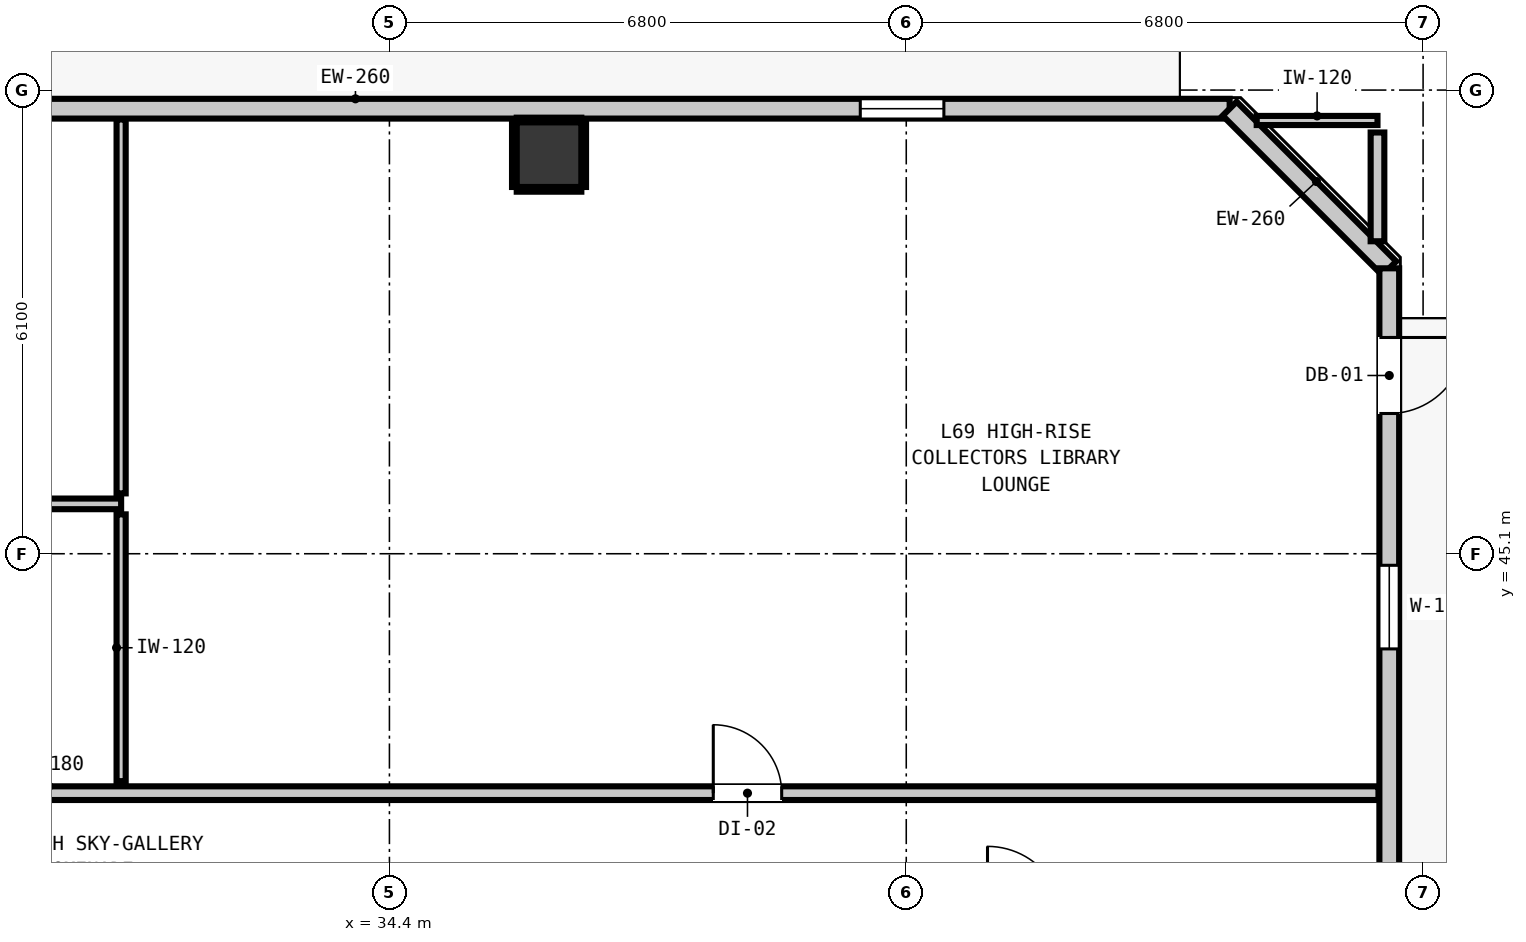
"""IFC4 building model, lengths in metres.
Left out: names, types, materials, properties, quantities, classifications, styles, units other than length and angle.
Written with IfcOpenShell. Run it as: python <this file> out.ifc"""

import sys

from ifc_helpers import new_model, si_unit, direction, frame, frame_2d, origin, origin_2d, place, context, subcontext, project, spatial, rectangle, extrude, element, fill, save


model = new_model("IFC4")
c1 = context("Model", 3, precision=1e-05, world=origin(), true_north=direction((0.0, 1.0)))
c2 = subcontext(c1, "Body", "Model", "MODEL_VIEW")
j1 = project(units=[si_unit("LENGTHUNIT", "METRE"), si_unit("PLANEANGLEUNIT", "RADIAN")], contexts=[c1])
p1 = place(None, origin())
s1 = spatial("IfcSite", under=j1, at=p1, CompositionType="ELEMENT")
p2 = place(p1, origin())
s2 = spatial("IfcBuilding", under=s1, at=p2, CompositionType="ELEMENT")
p3 = place(p2, frame((0.0, 0.0, 237.92)))
s3 = spatial("IfcBuildingStorey", under=s2, at=p3, CompositionType="ELEMENT", Elevation=237.92)
p4 = place(p3, frame((36.5, 50.35, 0.0), z_axis=(0.0, 0.0, 1.0), x_axis=(1.0, 0.0, 0.0)))
e1 = element("IfcColumn", 1, at=p4, inside=s3, PredefinedType="COLUMN", context=c2, shape_type="SweptSolid", body=[
    extrude(rectangle(XDim=0.85, YDim=0.85, at=origin_2d()), origin(), (0.0, 0.0, 1.0), 3.32),
])
p5 = place(p3, frame((12.745, 50.955, 0.0), z_axis=(0.0, 0.0, 1.0), x_axis=(1.0, 0.0, 0.0)))
e2 = element("IfcWall", 2, at=p5, inside=s3, PredefinedType="STANDARD", context=c2, shape_type="SweptSolid", body=[
    extrude(rectangle(XDim=32.71, YDim=0.26, at=frame_2d((16.355, 0.0))), origin(), (0.0, 0.0, 1.0), 3.1),
])
p6 = place(p5, frame((1.61, 0.0, 0.0)))
e3 = element("IfcOpeningElement", 3, at=p6, cuts=e2, PredefinedType="OPENING", context=c2, shape_type="SweptSolid", body=[
    extrude(rectangle(XDim=1.0, YDim=2.15, at=frame_2d((0.5, 1.075))), frame((0.0, 0.14, 0.0), z_axis=(0.0, -1.0, 0.0), x_axis=(1.0, 0.0, 0.0)), (0.0, 0.0, 1.0), 0.28),
])
p7 = place(p5, frame((5.301, 0.0, 0.85)))
e4 = element("IfcOpeningElement", 4, at=p7, cuts=e2, PredefinedType="OPENING", context=c2, shape_type="SweptSolid", body=[
    extrude(rectangle(XDim=1.1, YDim=2.05, at=frame_2d((0.55, 1.025))), frame((0.0, 0.14, 0.0), z_axis=(0.0, -1.0, 0.0), x_axis=(1.0, 0.0, 0.0)), (0.0, 0.0, 1.0), 0.28),
])
p8 = place(p5, frame((3.052, 0.0, 0.85)))
e5 = element("IfcOpeningElement", 5, at=p8, cuts=e2, PredefinedType="OPENING", context=c2, shape_type="SweptSolid", body=[
    extrude(rectangle(XDim=0.58, YDim=1.5, at=frame_2d((0.29, 0.75))), frame((0.0, 0.14, 0.0), z_axis=(0.0, -1.0, 0.0), x_axis=(1.0, 0.0, 0.0)), (0.0, 0.0, 1.0), 0.28),
])
p9 = place(p5, frame((13.466, 0.0, 0.85)))
e6 = element("IfcOpeningElement", 6, at=p9, cuts=e2, PredefinedType="OPENING", context=c2, shape_type="SweptSolid", body=[
    extrude(rectangle(XDim=1.1, YDim=2.05, at=frame_2d((0.55, 1.025))), frame((0.0, 0.14, 0.0), z_axis=(0.0, -1.0, 0.0), x_axis=(1.0, 0.0, 0.0)), (0.0, 0.0, 1.0), 0.28),
])
p10 = place(p5, frame((27.85, 0.0, 0.85)))
e7 = element("IfcOpeningElement", 7, at=p10, cuts=e2, PredefinedType="OPENING", context=c2, shape_type="SweptSolid", body=[
    extrude(rectangle(XDim=1.1, YDim=2.05, at=frame_2d((0.55, 1.025))), frame((0.0, 0.14, 0.0), z_axis=(0.0, -1.0, 0.0), x_axis=(1.0, 0.0, 0.0)), (0.0, 0.0, 1.0), 0.28),
])
p11 = place(p3, frame((45.455, 50.955, 0.0), z_axis=(0.0, 0.0, 1.0), x_axis=(0.707065676302, -0.707147883682, 0.0)))
e8 = element("IfcWall", 8, at=p11, inside=s3, PredefinedType="STANDARD", context=c2, shape_type="SweptSolid", body=[
    extrude(rectangle(XDim=2.97, YDim=0.26, at=frame_2d((1.485, 0.0))), origin(), (0.0, 0.0, 1.0), 3.1),
])
p12 = place(p3, frame((47.555, 48.855, 0.0), z_axis=(0.0, 0.0, 1.0), x_axis=(0.0, -1.0, 0.0)))
e9 = element("IfcWall", 9, at=p12, inside=s3, PredefinedType="STANDARD", context=c2, shape_type="SweptSolid", body=[
    extrude(rectangle(XDim=30.31, YDim=0.26, at=frame_2d((15.155, 0.0))), origin(), (0.0, 0.0, 1.0), 3.1),
])
p13 = place(p12, frame((0.91, 0.0, 0.0)))
e10 = element("IfcOpeningElement", 10, at=p13, cuts=e9, PredefinedType="OPENING", context=c2, shape_type="SweptSolid", body=[
    extrude(rectangle(XDim=1.0, YDim=2.15, at=frame_2d((0.5, 1.075))), frame((0.0, 0.14, 0.0), z_axis=(0.0, -1.0, 0.0), x_axis=(1.0, 0.0, 0.0)), (0.0, 0.0, 1.0), 0.28),
])
p14 = place(p12, frame((3.907, 0.0, 0.85)))
e11 = element("IfcOpeningElement", 11, at=p14, cuts=e9, PredefinedType="OPENING", context=c2, shape_type="SweptSolid", body=[
    extrude(rectangle(XDim=1.1, YDim=2.05, at=frame_2d((0.55, 1.025))), frame((0.0, 0.14, 0.0), z_axis=(0.0, -1.0, 0.0), x_axis=(1.0, 0.0, 0.0)), (0.0, 0.0, 1.0), 0.28),
])
p15 = place(p12, frame((21.955, 0.0, 0.85)))
e12 = element("IfcOpeningElement", 12, at=p15, cuts=e9, PredefinedType="OPENING", context=c2, shape_type="SweptSolid", body=[
    extrude(rectangle(XDim=1.1, YDim=2.05, at=frame_2d((0.55, 1.025))), frame((0.0, 0.14, 0.0), z_axis=(0.0, -1.0, 0.0), x_axis=(1.0, 0.0, 0.0)), (0.0, 0.0, 1.0), 0.28),
])
p16 = place(p3, frame((10.787, 41.95, 0.0), z_axis=(0.0, 0.0, 1.0), x_axis=(1.0, 0.0, 0.0)))
e13 = element("IfcWall", 13, at=p16, inside=s3, PredefinedType="PARTITIONING", context=c2, shape_type="SweptSolid", body=[
    extrude(rectangle(XDim=36.626, YDim=0.18, at=frame_2d((18.313, 0.0))), origin(), (0.0, 0.0, 1.0), 3.1),
])
p17 = place(p16, frame((9.396, 0.0, 0.0)))
e14 = element("IfcOpeningElement", 14, at=p17, cuts=e13, PredefinedType="OPENING", context=c2, shape_type="SweptSolid", body=[
    extrude(rectangle(XDim=1.0, YDim=2.15, at=frame_2d((0.5, 1.075))), frame((0.0, 0.1, 0.0), z_axis=(0.0, -1.0, 0.0), x_axis=(1.0, 0.0, 0.0)), (0.0, 0.0, 1.0), 0.2),
])
p18 = place(p16, frame((27.874, 0.0, 0.0)))
e15 = element("IfcOpeningElement", 15, at=p18, cuts=e13, PredefinedType="OPENING", context=c2, shape_type="SweptSolid", body=[
    extrude(rectangle(XDim=0.9, YDim=2.1, at=frame_2d((0.45, 1.05))), frame((0.0, 0.1, 0.0), z_axis=(0.0, -1.0, 0.0), x_axis=(1.0, 0.0, 0.0)), (0.0, 0.0, 1.0), 0.2),
])
p19 = place(p3, frame((24.648, 45.756, 0.0), z_axis=(0.0, 0.0, 1.0), x_axis=(1.0, 0.0, 0.0)))
e16 = element("IfcWall", 16, at=p19, inside=s3, PredefinedType="PARTITIONING", context=c2, shape_type="SweptSolid", body=[
    extrude(rectangle(XDim=6.222, YDim=0.14, at=frame_2d((3.111, 0.0))), origin(), (0.0, 0.0, 1.0), 3.1),
])
p20 = place(p3, frame((45.811, 50.8, 0.0), z_axis=(0.0, 0.0, 1.0), x_axis=(1.0, 0.0, 0.0)))
e17 = element("IfcWall", 17, at=p20, inside=s3, PredefinedType="PARTITIONING", context=c2, shape_type="SweptSolid", body=[
    extrude(rectangle(XDim=1.589, YDim=0.12, at=frame_2d((0.794, 0.0))), origin(), (0.0, 0.0, 1.0), 3.1),
])
p21 = place(p3, frame((47.4, 49.211, 0.0), z_axis=(0.0, 0.0, 1.0), x_axis=(0.0, 1.0, 0.0)))
e18 = element("IfcWall", 18, at=p21, inside=s3, PredefinedType="PARTITIONING", context=c2, shape_type="SweptSolid", body=[
    extrude(rectangle(XDim=1.431, YDim=0.18, at=frame_2d((0.716, 0.0))), origin(), (0.0, 0.0, 1.0), 3.1),
])
p22 = place(p3, frame((30.87, 42.108, 0.0), z_axis=(0.0, 0.0, 1.0), x_axis=(0.0, 1.0, 0.0)))
e19 = element("IfcWall", 19, at=p22, inside=s3, PredefinedType="PARTITIONING", context=c2, shape_type="SweptSolid", body=[
    extrude(rectangle(XDim=3.51, YDim=0.12, at=frame_2d((1.755, 0.0))), origin(), (0.0, 0.0, 1.0), 3.1),
])
p23 = place(p3, frame((30.87, 45.894, 0.0), z_axis=(0.0, 0.0, 1.0), x_axis=(0.0, 1.0, 0.0)))
e20 = element("IfcWall", 20, at=p23, inside=s3, PredefinedType="PARTITIONING", context=c2, shape_type="SweptSolid", body=[
    extrude(rectangle(XDim=4.919, YDim=0.12, at=frame_2d((2.459, 0.0))), origin(), (0.0, 0.0, 1.0), 3.1),
])
for number, where, z_axis, x_axis in (
    (21, (36.075, 49.893, 0.0), (0.0, 0.0, 1.0), (1.0, 0.0, 0.0)),
    (22, (36.075, 50.807, 0.0), (0.0, 0.0, 1.0), (1.0, 0.0, 0.0)),
):
    element("IfcWall", number, at=place(p3, frame(where, z_axis=z_axis, x_axis=x_axis)), inside=s3, PredefinedType="PARTITIONING", context=c2, shape_type="SweptSolid", body=[
        extrude(rectangle(XDim=0.85, YDim=0.06, at=frame_2d((0.425, 0.0))), origin(), (0.0, 0.0, 1.0), 1.45),
    ])
for number, where, z_axis, x_axis in (
    (23, (36.043, 49.925, 0.0), (0.0, 0.0, 1.0), (0.0, 1.0, 0.0)),
    (24, (36.957, 49.925, 0.0), (0.0, 0.0, 1.0), (0.0, 1.0, 0.0)),
):
    element("IfcWall", number, at=place(p3, frame(where, z_axis=z_axis, x_axis=x_axis)), inside=s3, PredefinedType="PARTITIONING", context=c2, shape_type="SweptSolid", body=[
        extrude(rectangle(XDim=0.85, YDim=0.06, at=frame_2d((0.425, 0.0))), origin(), (0.0, 0.0, 1.0), 1.45),
    ])
p24 = place(p13, origin())
e25 = element("IfcDoor", 25, at=p24, inside=s3, OperationType="SINGLE_SWING_LEFT", PredefinedType="DOOR", context=c2, shape_type="SweptSolid", body=[
    extrude(rectangle(XDim=1.0, YDim=2.15, at=frame_2d((0.5, 1.075))), frame((0.0, 0.025, 0.0), z_axis=(0.0, -1.0, 0.0), x_axis=(1.0, 0.0, 0.0)), (0.0, 0.0, 1.0), 0.05),
])
fill(e10, e25)
p25 = place(p10, origin())
e26 = element("IfcWindow", 26, at=p25, inside=s3, PartitioningType="SINGLE_PANEL", PredefinedType="WINDOW", context=c2, shape_type="SweptSolid", body=[
    extrude(rectangle(XDim=1.1, YDim=2.05, at=frame_2d((0.55, 1.025))), frame((0.0, 0.03, 0.0), z_axis=(0.0, -1.0, 0.0), x_axis=(1.0, 0.0, 0.0)), (0.0, 0.0, 1.0), 0.06),
])
fill(e7, e26)
p26 = place(p14, origin())
e27 = element("IfcWindow", 27, at=p26, inside=s3, PartitioningType="SINGLE_PANEL", PredefinedType="WINDOW", context=c2, shape_type="SweptSolid", body=[
    extrude(rectangle(XDim=1.1, YDim=2.05, at=frame_2d((0.55, 1.025))), frame((0.0, 0.03, 0.0), z_axis=(0.0, -1.0, 0.0), x_axis=(1.0, 0.0, 0.0)), (0.0, 0.0, 1.0), 0.06),
])
fill(e11, e27)
p27 = place(p18, origin())
e28 = element("IfcDoor", 28, at=p27, inside=s3, OperationType="SINGLE_SWING_LEFT", PredefinedType="DOOR", context=c2, shape_type="SweptSolid", body=[
    extrude(rectangle(XDim=0.9, YDim=2.1, at=frame_2d((0.45, 1.05))), frame((0.0, 0.025, 0.0), z_axis=(0.0, -1.0, 0.0), x_axis=(1.0, 0.0, 0.0)), (0.0, 0.0, 1.0), 0.05),
])
fill(e15, e28)
save(model, sys.argv[1])
